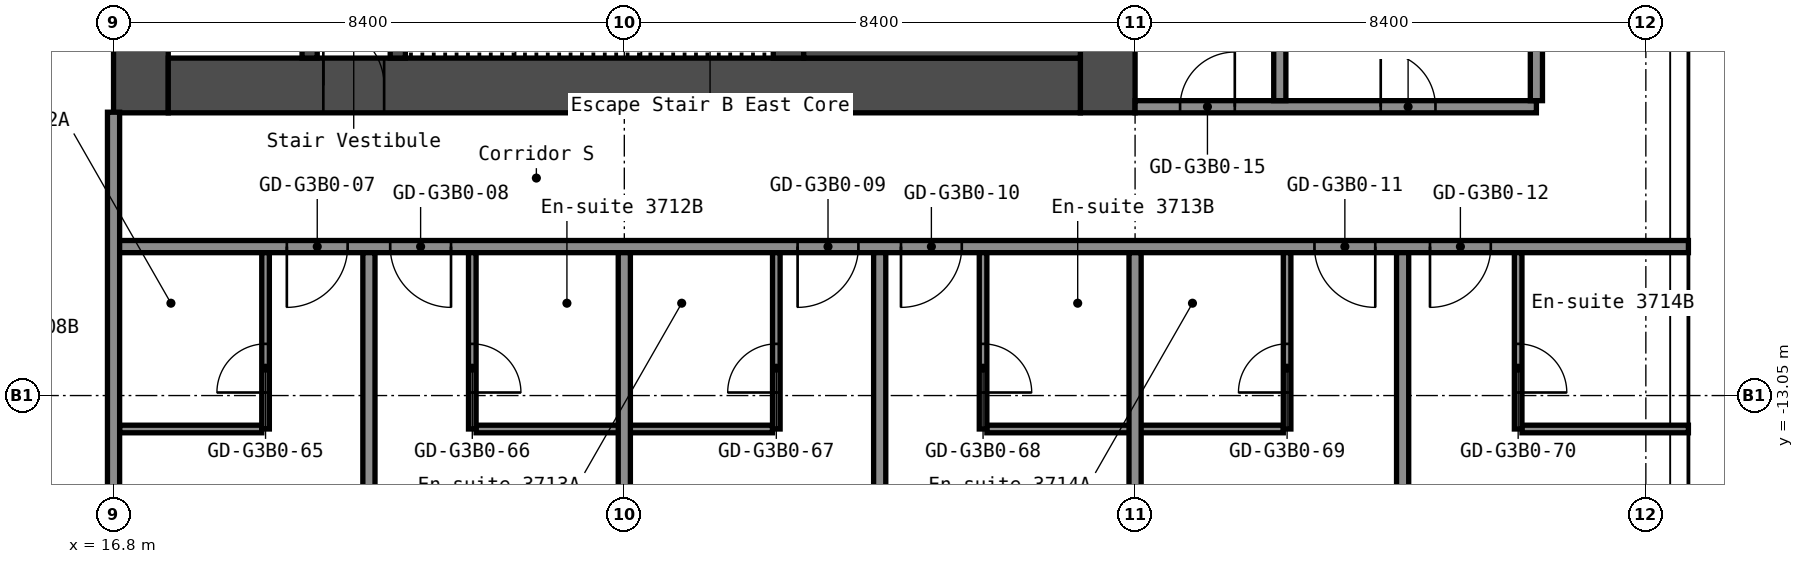
"""IFC4 building model, lengths in metres.
Left out: names, types, materials, properties, quantities, classifications, styles, units other than length and angle.
Written with IfcOpenShell. Run it as: python <this file> out.ifc"""

import sys

from ifc_helpers import new_model, si_unit, direction, frame, frame_2d, origin, place, context, subcontext, project, spatial, rectangle, extrude, element, fill, save


model = new_model("IFC4")
c1 = context("Model", 3, precision=1e-05, world=origin(), true_north=direction((0.0, 1.0)))
c2 = subcontext(c1, "Body", "Model", "MODEL_VIEW")
j1 = project(units=[si_unit("LENGTHUNIT", "METRE"), si_unit("PLANEANGLEUNIT", "RADIAN")], contexts=[c1])
p1 = place(None, origin())
s1 = spatial("IfcSite", under=j1, at=p1, CompositionType="ELEMENT")
p2 = place(p1, origin())
s2 = spatial("IfcBuilding", under=s1, at=p2, CompositionType="ELEMENT")
p3 = place(p2, frame((0.0, 0.0, 134.2)))
s3 = spatial("IfcBuildingStorey", under=s2, at=p3, CompositionType="ELEMENT", Elevation=134.2)
p4 = place(p3, frame((17.25, -8.4, 0.0), z_axis=(0.0, 0.0, 1.0), x_axis=(0.0, 1.0, 0.0)))
e1 = element("IfcWall", 1, at=p4, inside=s3, PredefinedType="SHEAR", context=c2, shape_type="SweptSolid", body=[
    extrude(rectangle(XDim=16.8, YDim=0.9, at=frame_2d((8.4, 0.0))), origin(), (0.0, 0.0, 1.0), 2.75),
])
p5 = place(p4, frame((7.1, 0.0, 0.0)))
e2 = element("IfcOpeningElement", 2, at=p5, cuts=e1, PredefinedType="OPENING", context=c2, shape_type="SweptSolid", body=[
    extrude(rectangle(XDim=1.6, YDim=2.1, at=frame_2d((0.8, 1.05))), frame((0.0, 0.46, 0.0), z_axis=(0.0, -1.0, 0.0), x_axis=(1.0, 0.0, 0.0)), (0.0, 0.0, 1.0), 0.92),
])
p6 = place(p3, frame((33.15, -8.4, 0.0), z_axis=(0.0, 0.0, 1.0), x_axis=(0.0, 1.0, 0.0)))
e3 = element("IfcWall", 3, at=p6, inside=s3, PredefinedType="SHEAR", context=c2, shape_type="SweptSolid", body=[
    extrude(rectangle(XDim=16.8, YDim=0.9, at=frame_2d((8.4, 0.0))), origin(), (0.0, 0.0, 1.0), 2.75),
])
p7 = place(p3, frame((17.7, -7.95, 0.0), z_axis=(0.0, 0.0, 1.0), x_axis=(1.0, 0.0, 0.0)))
e4 = element("IfcWall", 4, at=p7, inside=s3, PredefinedType="SHEAR", context=c2, shape_type="SweptSolid", body=[
    extrude(rectangle(XDim=15.0, YDim=0.9, at=frame_2d((7.5, 0.0))), origin(), (0.0, 0.0, 1.0), 2.75),
])
p8 = place(p7, frame((2.55, 0.0, 0.0)))
e5 = element("IfcOpeningElement", 5, at=p8, cuts=e4, PredefinedType="OPENING", context=c2, shape_type="SweptSolid", body=[
    extrude(rectangle(XDim=1.0, YDim=2.1, at=frame_2d((0.5, 1.05))), frame((0.0, 0.46, 0.0), z_axis=(0.0, -1.0, 0.0), x_axis=(1.0, 0.0, 0.0)), (0.0, 0.0, 1.0), 0.92),
])
p9 = place(p3, frame((20.025, -7.5, 0.0), z_axis=(0.0, 0.0, 1.0), x_axis=(0.0, 1.0, 0.0)))
e6 = element("IfcWall", 6, at=p9, inside=s3, PredefinedType="SHEAR", context=c2, shape_type="SweptSolid", body=[
    extrude(rectangle(XDim=6.3, YDim=0.25, at=frame_2d((3.15, 0.0))), origin(), (0.0, 0.0, 1.0), 2.75),
])
p10 = place(p9, frame((2.4, 0.0, 0.0)))
e7 = element("IfcOpeningElement", 7, at=p10, cuts=e6, PredefinedType="OPENING", context=c2, shape_type="SweptSolid", body=[
    extrude(rectangle(XDim=1.0, YDim=2.1, at=frame_2d((0.5, 1.05))), frame((0.0, 0.135, 0.0), z_axis=(0.0, -1.0, 0.0), x_axis=(1.0, 0.0, 0.0)), (0.0, 0.0, 1.0), 0.27),
])
p11 = place(p3, frame((21.475, -7.5, 0.0), z_axis=(0.0, 0.0, 1.0), x_axis=(0.0, 1.0, 0.0)))
e8 = element("IfcWall", 8, at=p11, inside=s3, PredefinedType="SHEAR", context=c2, shape_type="SweptSolid", body=[
    extrude(rectangle(XDim=3.75, YDim=0.25, at=frame_2d((1.875, 0.0))), origin(), (0.0, 0.0, 1.0), 2.75),
])
p12 = place(p11, frame((1.3, 0.0, 0.0)))
e9 = element("IfcOpeningElement", 9, at=p12, cuts=e8, PredefinedType="OPENING", context=c2, shape_type="SweptSolid", body=[
    extrude(rectangle(XDim=1.2, YDim=2.1, at=frame_2d((0.6, 1.05))), frame((0.0, 0.135, 0.0), z_axis=(0.0, -1.0, 0.0), x_axis=(1.0, 0.0, 0.0)), (0.0, 0.0, 1.0), 0.27),
])
p13 = place(p3, frame((27.9, -7.5, 0.0), z_axis=(0.0, 0.0, 1.0), x_axis=(0.0, 1.0, 0.0)))
e10 = element("IfcWall", 10, at=p13, inside=s3, PredefinedType="SHEAR", context=c2, shape_type="SweptSolid", body=[
    extrude(rectangle(XDim=3.75, YDim=0.5, at=frame_2d((1.875, 0.0))), origin(), (0.0, 0.0, 1.0), 2.75),
])
p14 = place(p3, frame((28.15, -6.75, 0.0), z_axis=(0.0, 0.0, 1.0), x_axis=(1.0, 0.0, 0.0)))
e11 = element("IfcWall", 11, at=p14, inside=s3, PredefinedType="SHEAR", context=c2, shape_type="SweptSolid", body=[
    extrude(rectangle(XDim=4.55, YDim=1.5, at=frame_2d((2.275, 0.0))), origin(), (0.0, 0.0, 1.0), 2.75),
])
p15 = place(p3, frame((16.9, -13.6, 0.0), z_axis=(0.0, 0.0, 1.0), x_axis=(1.0, 0.0, 0.0)))
e12 = element("IfcWall", 12, at=p15, inside=s3, PredefinedType="PARTITIONING", context=c2, shape_type="SweptSolid", body=[
    extrude(rectangle(XDim=2.338, YDim=0.125, at=frame_2d((1.169, 0.0))), origin(), (0.0, 0.0, 1.0), 2.75),
])
for number, where, z_axis, x_axis in (
    (13, (22.762, -13.6, 0.0), (0.0, 0.0, 1.0), (1.0, 0.0, 0.0)),
    (14, (31.163, -13.6, 0.0), (0.0, 0.0, 1.0), (1.0, 0.0, 0.0)),
):
    element("IfcWall", number, at=place(p3, frame(where, z_axis=z_axis, x_axis=x_axis)), inside=s3, PredefinedType="PARTITIONING", context=c2, shape_type="SweptSolid", body=[
        extrude(rectangle(XDim=4.875, YDim=0.125, at=frame_2d((2.438, 0.0))), origin(), (0.0, 0.0, 1.0), 2.75),
    ])
p16 = place(p3, frame((39.962, -13.6, 0.0), z_axis=(0.0, 0.0, 1.0), x_axis=(1.0, 0.0, 0.0)))
e15 = element("IfcWall", 15, at=p16, inside=s3, PredefinedType="PARTITIONING", context=c2, shape_type="SweptSolid", body=[
    extrude(rectangle(XDim=2.738, YDim=0.125, at=frame_2d((1.369, 0.0))), origin(), (0.0, 0.0, 1.0), 2.75),
])
p17 = place(p3, frame((16.8, -10.6, 0.0), z_axis=(0.0, 0.0, 1.0), x_axis=(1.0, 0.0, 0.0)))
e16 = element("IfcWall", 16, at=p17, inside=s3, PredefinedType="PARTITIONING", context=c2, shape_type="SweptSolid", body=[
    extrude(rectangle(XDim=25.9, YDim=0.2, at=frame_2d((12.95, 0.0))), origin(), (0.0, 0.0, 1.0), 2.75),
])
p18 = place(p17, frame((2.85, 0.0, 0.0)))
e17 = element("IfcOpeningElement", 17, at=p18, cuts=e16, PredefinedType="OPENING", context=c2, shape_type="SweptSolid", body=[
    extrude(rectangle(XDim=1.0, YDim=2.1, at=frame_2d((0.5, 1.05))), frame((0.0, 0.11, 0.0), z_axis=(0.0, -1.0, 0.0), x_axis=(1.0, 0.0, 0.0)), (0.0, 0.0, 1.0), 0.22),
])
p19 = place(p17, frame((4.55, 0.0, 0.0)))
e18 = element("IfcOpeningElement", 18, at=p19, cuts=e16, PredefinedType="OPENING", context=c2, shape_type="SweptSolid", body=[
    extrude(rectangle(XDim=1.0, YDim=2.1, at=frame_2d((0.5, 1.05))), frame((0.0, 0.11, 0.0), z_axis=(0.0, -1.0, 0.0), x_axis=(1.0, 0.0, 0.0)), (0.0, 0.0, 1.0), 0.22),
])
p20 = place(p17, frame((11.25, 0.0, 0.0)))
e19 = element("IfcOpeningElement", 19, at=p20, cuts=e16, PredefinedType="OPENING", context=c2, shape_type="SweptSolid", body=[
    extrude(rectangle(XDim=1.0, YDim=2.1, at=frame_2d((0.5, 1.05))), frame((0.0, 0.11, 0.0), z_axis=(0.0, -1.0, 0.0), x_axis=(1.0, 0.0, 0.0)), (0.0, 0.0, 1.0), 0.22),
])
p21 = place(p17, frame((12.95, 0.0, 0.0)))
e20 = element("IfcOpeningElement", 20, at=p21, cuts=e16, PredefinedType="OPENING", context=c2, shape_type="SweptSolid", body=[
    extrude(rectangle(XDim=1.0, YDim=2.1, at=frame_2d((0.5, 1.05))), frame((0.0, 0.11, 0.0), z_axis=(0.0, -1.0, 0.0), x_axis=(1.0, 0.0, 0.0)), (0.0, 0.0, 1.0), 0.22),
])
p22 = place(p17, frame((19.75, 0.0, 0.0)))
e21 = element("IfcOpeningElement", 21, at=p22, cuts=e16, PredefinedType="OPENING", context=c2, shape_type="SweptSolid", body=[
    extrude(rectangle(XDim=1.0, YDim=2.1, at=frame_2d((0.5, 1.05))), frame((0.0, 0.11, 0.0), z_axis=(0.0, -1.0, 0.0), x_axis=(1.0, 0.0, 0.0)), (0.0, 0.0, 1.0), 0.22),
])
p23 = place(p17, frame((21.65, 0.0, 0.0)))
e22 = element("IfcOpeningElement", 22, at=p23, cuts=e16, PredefinedType="OPENING", context=c2, shape_type="SweptSolid", body=[
    extrude(rectangle(XDim=1.0, YDim=2.1, at=frame_2d((0.5, 1.05))), frame((0.0, 0.11, 0.0), z_axis=(0.0, -1.0, 0.0), x_axis=(1.0, 0.0, 0.0)), (0.0, 0.0, 1.0), 0.22),
])
p24 = place(p3, frame((33.6, -8.3, 0.0), z_axis=(0.0, 0.0, 1.0), x_axis=(1.0, 0.0, 0.0)))
e23 = element("IfcWall", 23, at=p24, inside=s3, PredefinedType="PARTITIONING", context=c2, shape_type="SweptSolid", body=[
    extrude(rectangle(XDim=6.6, YDim=0.2, at=frame_2d((3.3, 0.0))), origin(), (0.0, 0.0, 1.0), 2.75),
])
p25 = place(p24, frame((0.74, 0.0, 0.0)))
e24 = element("IfcOpeningElement", 24, at=p25, cuts=e23, PredefinedType="OPENING", context=c2, shape_type="SweptSolid", body=[
    extrude(rectangle(XDim=0.9, YDim=2.1, at=frame_2d((0.45, 1.05))), frame((0.0, 0.11, 0.0), z_axis=(0.0, -1.0, 0.0), x_axis=(1.0, 0.0, 0.0)), (0.0, 0.0, 1.0), 0.22),
])
p26 = place(p24, frame((4.04, 0.0, 0.0)))
e25 = element("IfcOpeningElement", 25, at=p26, cuts=e23, PredefinedType="OPENING", context=c2, shape_type="SweptSolid", body=[
    extrude(rectangle(XDim=0.9, YDim=2.1, at=frame_2d((0.45, 1.05))), frame((0.0, 0.11, 0.0), z_axis=(0.0, -1.0, 0.0), x_axis=(1.0, 0.0, 0.0)), (0.0, 0.0, 1.0), 0.22),
])
p27 = place(p3, frame((16.8, -19.3, 0.0), z_axis=(0.0, 0.0, 1.0), x_axis=(0.0, 1.0, 0.0)))
e26 = element("IfcWall", 26, at=p27, inside=s3, PredefinedType="PARTITIONING", context=c2, shape_type="SweptSolid", body=[
    extrude(rectangle(XDim=10.91, YDim=0.2, at=frame_2d((5.455, 0.0))), origin(), (0.0, 0.0, 1.0), 2.75),
])
p28 = place(p3, frame((19.3, -13.6, 0.0), z_axis=(0.0, 0.0, 1.0), x_axis=(0.0, 1.0, 0.0)))
e27 = element("IfcWall", 27, at=p28, inside=s3, PredefinedType="PARTITIONING", context=c2, shape_type="SweptSolid", body=[
    extrude(rectangle(XDim=2.9, YDim=0.125, at=frame_2d((1.45, 0.0))), origin(), (0.0, 0.0, 1.0), 2.75),
])
p29 = place(p28, frame((0.6, 0.0, 0.0)))
e28 = element("IfcOpeningElement", 28, at=p29, cuts=e27, PredefinedType="OPENING", context=c2, shape_type="SweptSolid", body=[
    extrude(rectangle(XDim=0.8, YDim=2.1, at=frame_2d((0.4, 1.05))), frame((0.0, 0.073, 0.0), z_axis=(0.0, -1.0, 0.0), x_axis=(1.0, 0.0, 0.0)), (0.0, 0.0, 1.0), 0.145),
])
p30 = place(p3, frame((21.0, -19.3, 0.0), z_axis=(0.0, 0.0, 1.0), x_axis=(0.0, 1.0, 0.0)))
e29 = element("IfcWall", 29, at=p30, inside=s3, PredefinedType="PARTITIONING", context=c2, shape_type="SweptSolid", body=[
    extrude(rectangle(XDim=8.6, YDim=0.2, at=frame_2d((4.3, 0.0))), origin(), (0.0, 0.0, 1.0), 2.75),
])
p31 = place(p3, frame((22.7, -13.6, 0.0), z_axis=(0.0, 0.0, 1.0), x_axis=(0.0, 1.0, 0.0)))
e30 = element("IfcWall", 30, at=p31, inside=s3, PredefinedType="PARTITIONING", context=c2, shape_type="SweptSolid", body=[
    extrude(rectangle(XDim=2.9, YDim=0.125, at=frame_2d((1.45, 0.0))), origin(), (0.0, 0.0, 1.0), 2.75),
])
p32 = place(p31, frame((0.6, 0.0, 0.0)))
e31 = element("IfcOpeningElement", 31, at=p32, cuts=e30, PredefinedType="OPENING", context=c2, shape_type="SweptSolid", body=[
    extrude(rectangle(XDim=0.8, YDim=2.1, at=frame_2d((0.4, 1.05))), frame((0.0, 0.073, 0.0), z_axis=(0.0, -1.0, 0.0), x_axis=(1.0, 0.0, 0.0)), (0.0, 0.0, 1.0), 0.145),
])
p33 = place(p3, frame((25.2, -19.3, 0.0), z_axis=(0.0, 0.0, 1.0), x_axis=(0.0, 1.0, 0.0)))
e32 = element("IfcWall", 32, at=p33, inside=s3, PredefinedType="PARTITIONING", context=c2, shape_type="SweptSolid", body=[
    extrude(rectangle(XDim=8.6, YDim=0.2, at=frame_2d((4.3, 0.0))), origin(), (0.0, 0.0, 1.0), 2.75),
])
p34 = place(p3, frame((27.7, -13.6, 0.0), z_axis=(0.0, 0.0, 1.0), x_axis=(0.0, 1.0, 0.0)))
e33 = element("IfcWall", 33, at=p34, inside=s3, PredefinedType="PARTITIONING", context=c2, shape_type="SweptSolid", body=[
    extrude(rectangle(XDim=2.9, YDim=0.125, at=frame_2d((1.45, 0.0))), origin(), (0.0, 0.0, 1.0), 2.75),
])
p35 = place(p34, frame((0.6, 0.0, 0.0)))
e34 = element("IfcOpeningElement", 34, at=p35, cuts=e33, PredefinedType="OPENING", context=c2, shape_type="SweptSolid", body=[
    extrude(rectangle(XDim=0.8, YDim=2.1, at=frame_2d((0.4, 1.05))), frame((0.0, 0.073, 0.0), z_axis=(0.0, -1.0, 0.0), x_axis=(1.0, 0.0, 0.0)), (0.0, 0.0, 1.0), 0.145),
])
p36 = place(p3, frame((29.4, -19.3, 0.0), z_axis=(0.0, 0.0, 1.0), x_axis=(0.0, 1.0, 0.0)))
e35 = element("IfcWall", 35, at=p36, inside=s3, PredefinedType="PARTITIONING", context=c2, shape_type="SweptSolid", body=[
    extrude(rectangle(XDim=8.6, YDim=0.2, at=frame_2d((4.3, 0.0))), origin(), (0.0, 0.0, 1.0), 2.75),
])
p37 = place(p3, frame((31.1, -13.6, 0.0), z_axis=(0.0, 0.0, 1.0), x_axis=(0.0, 1.0, 0.0)))
e36 = element("IfcWall", 36, at=p37, inside=s3, PredefinedType="PARTITIONING", context=c2, shape_type="SweptSolid", body=[
    extrude(rectangle(XDim=2.9, YDim=0.125, at=frame_2d((1.45, 0.0))), origin(), (0.0, 0.0, 1.0), 2.75),
])
p38 = place(p37, frame((0.6, 0.0, 0.0)))
e37 = element("IfcOpeningElement", 37, at=p38, cuts=e36, PredefinedType="OPENING", context=c2, shape_type="SweptSolid", body=[
    extrude(rectangle(XDim=0.8, YDim=2.1, at=frame_2d((0.4, 1.05))), frame((0.0, 0.073, 0.0), z_axis=(0.0, -1.0, 0.0), x_axis=(1.0, 0.0, 0.0)), (0.0, 0.0, 1.0), 0.145),
])
p39 = place(p3, frame((33.6, -19.3, 0.0), z_axis=(0.0, 0.0, 1.0), x_axis=(0.0, 1.0, 0.0)))
e38 = element("IfcWall", 38, at=p39, inside=s3, PredefinedType="PARTITIONING", context=c2, shape_type="SweptSolid", body=[
    extrude(rectangle(XDim=8.6, YDim=0.2, at=frame_2d((4.3, 0.0))), origin(), (0.0, 0.0, 1.0), 2.75),
])
p40 = place(p3, frame((35.98, -8.2, 0.0), z_axis=(0.0, 0.0, 1.0), x_axis=(0.0, 1.0, 0.0)))
e39 = element("IfcWall", 39, at=p40, inside=s3, PredefinedType="PARTITIONING", context=c2, shape_type="SweptSolid", body=[
    extrude(rectangle(XDim=8.2, YDim=0.2, at=frame_2d((4.1, 0.0))), origin(), (0.0, 0.0, 1.0), 2.75),
])
p41 = place(p3, frame((36.1, -13.6, 0.0), z_axis=(0.0, 0.0, 1.0), x_axis=(0.0, 1.0, 0.0)))
e40 = element("IfcWall", 40, at=p41, inside=s3, PredefinedType="PARTITIONING", context=c2, shape_type="SweptSolid", body=[
    extrude(rectangle(XDim=2.9, YDim=0.125, at=frame_2d((1.45, 0.0))), origin(), (0.0, 0.0, 1.0), 2.75),
])
p42 = place(p41, frame((0.6, 0.0, 0.0)))
e41 = element("IfcOpeningElement", 41, at=p42, cuts=e40, PredefinedType="OPENING", context=c2, shape_type="SweptSolid", body=[
    extrude(rectangle(XDim=0.8, YDim=2.1, at=frame_2d((0.4, 1.05))), frame((0.0, 0.073, 0.0), z_axis=(0.0, -1.0, 0.0), x_axis=(1.0, 0.0, 0.0)), (0.0, 0.0, 1.0), 0.145),
])
p43 = place(p3, frame((38.0, -19.3, 0.0), z_axis=(0.0, 0.0, 1.0), x_axis=(0.0, 1.0, 0.0)))
e42 = element("IfcWall", 42, at=p43, inside=s3, PredefinedType="PARTITIONING", context=c2, shape_type="SweptSolid", body=[
    extrude(rectangle(XDim=8.6, YDim=0.2, at=frame_2d((4.3, 0.0))), origin(), (0.0, 0.0, 1.0), 2.75),
])
p44 = place(p3, frame((39.9, -13.6, 0.0), z_axis=(0.0, 0.0, 1.0), x_axis=(0.0, 1.0, 0.0)))
e43 = element("IfcWall", 43, at=p44, inside=s3, PredefinedType="PARTITIONING", context=c2, shape_type="SweptSolid", body=[
    extrude(rectangle(XDim=2.9, YDim=0.125, at=frame_2d((1.45, 0.0))), origin(), (0.0, 0.0, 1.0), 2.75),
])
p45 = place(p44, frame((0.6, 0.0, 0.0)))
e44 = element("IfcOpeningElement", 44, at=p45, cuts=e43, PredefinedType="OPENING", context=c2, shape_type="SweptSolid", body=[
    extrude(rectangle(XDim=0.8, YDim=2.1, at=frame_2d((0.4, 1.05))), frame((0.0, 0.073, 0.0), z_axis=(0.0, -1.0, 0.0), x_axis=(1.0, 0.0, 0.0)), (0.0, 0.0, 1.0), 0.145),
])
p46 = place(p3, frame((40.2, -8.2, 0.0), z_axis=(0.0, 0.0, 1.0), x_axis=(0.0, 1.0, 0.0)))
e45 = element("IfcWall", 45, at=p46, inside=s3, PredefinedType="PARTITIONING", context=c2, shape_type="SweptSolid", body=[
    extrude(rectangle(XDim=16.4, YDim=0.2, at=frame_2d((8.2, 0.0))), origin(), (0.0, 0.0, 1.0), 2.75),
])
p47 = place(p8, origin())
e46 = element("IfcDoor", 46, at=p47, inside=s3, OperationType="SINGLE_SWING_RIGHT", PredefinedType="DOOR", context=c2, shape_type="SweptSolid", body=[
    extrude(rectangle(XDim=1.0, YDim=2.1, at=frame_2d((0.5, 1.05))), frame((0.0, 0.025, 0.0), z_axis=(0.0, -1.0, 0.0), x_axis=(1.0, 0.0, 0.0)), (0.0, 0.0, 1.0), 0.05),
])
fill(e5, e46)
p48 = place(p18, origin())
e47 = element("IfcDoor", 47, at=p48, inside=s3, OperationType="SINGLE_SWING_LEFT", PredefinedType="DOOR", context=c2, shape_type="SweptSolid", body=[
    extrude(rectangle(XDim=1.0, YDim=2.1, at=frame_2d((0.5, 1.05))), frame((0.0, 0.025, 0.0), z_axis=(0.0, -1.0, 0.0), x_axis=(1.0, 0.0, 0.0)), (0.0, 0.0, 1.0), 0.05),
])
fill(e17, e47)
p49 = place(p19, origin())
e48 = element("IfcDoor", 48, at=p49, inside=s3, OperationType="SINGLE_SWING_RIGHT", PredefinedType="DOOR", context=c2, shape_type="SweptSolid", body=[
    extrude(rectangle(XDim=1.0, YDim=2.1, at=frame_2d((0.5, 1.05))), frame((0.0, 0.025, 0.0), z_axis=(0.0, -1.0, 0.0), x_axis=(1.0, 0.0, 0.0)), (0.0, 0.0, 1.0), 0.05),
])
fill(e18, e48)
p50 = place(p20, origin())
e49 = element("IfcDoor", 49, at=p50, inside=s3, OperationType="SINGLE_SWING_LEFT", PredefinedType="DOOR", context=c2, shape_type="SweptSolid", body=[
    extrude(rectangle(XDim=1.0, YDim=2.1, at=frame_2d((0.5, 1.05))), frame((0.0, 0.025, 0.0), z_axis=(0.0, -1.0, 0.0), x_axis=(1.0, 0.0, 0.0)), (0.0, 0.0, 1.0), 0.05),
])
fill(e19, e49)
p51 = place(p21, origin())
e50 = element("IfcDoor", 50, at=p51, inside=s3, OperationType="SINGLE_SWING_LEFT", PredefinedType="DOOR", context=c2, shape_type="SweptSolid", body=[
    extrude(rectangle(XDim=1.0, YDim=2.1, at=frame_2d((0.5, 1.05))), frame((0.0, 0.025, 0.0), z_axis=(0.0, -1.0, 0.0), x_axis=(1.0, 0.0, 0.0)), (0.0, 0.0, 1.0), 0.05),
])
fill(e20, e50)
p52 = place(p22, origin())
e51 = element("IfcDoor", 51, at=p52, inside=s3, OperationType="SINGLE_SWING_RIGHT", PredefinedType="DOOR", context=c2, shape_type="SweptSolid", body=[
    extrude(rectangle(XDim=1.0, YDim=2.1, at=frame_2d((0.5, 1.05))), frame((0.0, 0.025, 0.0), z_axis=(0.0, -1.0, 0.0), x_axis=(1.0, 0.0, 0.0)), (0.0, 0.0, 1.0), 0.05),
])
fill(e21, e51)
p53 = place(p23, origin())
e52 = element("IfcDoor", 52, at=p53, inside=s3, OperationType="SINGLE_SWING_LEFT", PredefinedType="DOOR", context=c2, shape_type="SweptSolid", body=[
    extrude(rectangle(XDim=1.0, YDim=2.1, at=frame_2d((0.5, 1.05))), frame((0.0, 0.025, 0.0), z_axis=(0.0, -1.0, 0.0), x_axis=(1.0, 0.0, 0.0)), (0.0, 0.0, 1.0), 0.05),
])
fill(e22, e52)
p54 = place(p25, origin())
e53 = element("IfcDoor", 53, at=p54, inside=s3, OperationType="SINGLE_SWING_LEFT", PredefinedType="DOOR", context=c2, shape_type="SweptSolid", body=[
    extrude(rectangle(XDim=0.9, YDim=2.1, at=frame_2d((0.45, 1.05))), frame((0.0, 0.025, 0.0), z_axis=(0.0, -1.0, 0.0), x_axis=(1.0, 0.0, 0.0)), (0.0, 0.0, 1.0), 0.05),
])
fill(e24, e53)
p55 = place(p26, origin())
e54 = element("IfcDoor", 54, at=p55, inside=s3, OperationType="SINGLE_SWING_RIGHT", PredefinedType="DOOR", context=c2, shape_type="SweptSolid", body=[
    extrude(rectangle(XDim=0.9, YDim=2.1, at=frame_2d((0.45, 1.05))), frame((0.0, 0.025, 0.0), z_axis=(0.0, -1.0, 0.0), x_axis=(1.0, 0.0, 0.0)), (0.0, 0.0, 1.0), 0.05),
])
fill(e25, e54)
p56 = place(p29, origin())
e55 = element("IfcDoor", 55, at=p56, inside=s3, OperationType="SINGLE_SWING_RIGHT", PredefinedType="DOOR", context=c2, shape_type="SweptSolid", body=[
    extrude(rectangle(XDim=0.8, YDim=2.1, at=frame_2d((0.4, 1.05))), frame((0.0, 0.025, 0.0), z_axis=(0.0, -1.0, 0.0), x_axis=(1.0, 0.0, 0.0)), (0.0, 0.0, 1.0), 0.05),
])
fill(e28, e55)
p57 = place(p32, origin())
e56 = element("IfcDoor", 56, at=p57, inside=s3, OperationType="SINGLE_SWING_LEFT", PredefinedType="DOOR", context=c2, shape_type="SweptSolid", body=[
    extrude(rectangle(XDim=0.8, YDim=2.1, at=frame_2d((0.4, 1.05))), frame((0.0, 0.025, 0.0), z_axis=(0.0, -1.0, 0.0), x_axis=(1.0, 0.0, 0.0)), (0.0, 0.0, 1.0), 0.05),
])
fill(e31, e56)
p58 = place(p35, origin())
e57 = element("IfcDoor", 57, at=p58, inside=s3, OperationType="SINGLE_SWING_RIGHT", PredefinedType="DOOR", context=c2, shape_type="SweptSolid", body=[
    extrude(rectangle(XDim=0.8, YDim=2.1, at=frame_2d((0.4, 1.05))), frame((0.0, 0.025, 0.0), z_axis=(0.0, -1.0, 0.0), x_axis=(1.0, 0.0, 0.0)), (0.0, 0.0, 1.0), 0.05),
])
fill(e34, e57)
p59 = place(p38, origin())
e58 = element("IfcDoor", 58, at=p59, inside=s3, OperationType="SINGLE_SWING_LEFT", PredefinedType="DOOR", context=c2, shape_type="SweptSolid", body=[
    extrude(rectangle(XDim=0.8, YDim=2.1, at=frame_2d((0.4, 1.05))), frame((0.0, 0.025, 0.0), z_axis=(0.0, -1.0, 0.0), x_axis=(1.0, 0.0, 0.0)), (0.0, 0.0, 1.0), 0.05),
])
fill(e37, e58)
p60 = place(p42, origin())
e59 = element("IfcDoor", 59, at=p60, inside=s3, OperationType="SINGLE_SWING_RIGHT", PredefinedType="DOOR", context=c2, shape_type="SweptSolid", body=[
    extrude(rectangle(XDim=0.8, YDim=2.1, at=frame_2d((0.4, 1.05))), frame((0.0, 0.025, 0.0), z_axis=(0.0, -1.0, 0.0), x_axis=(1.0, 0.0, 0.0)), (0.0, 0.0, 1.0), 0.05),
])
fill(e41, e59)
p61 = place(p45, origin())
e60 = element("IfcDoor", 60, at=p61, inside=s3, OperationType="SINGLE_SWING_LEFT", PredefinedType="DOOR", context=c2, shape_type="SweptSolid", body=[
    extrude(rectangle(XDim=0.8, YDim=2.1, at=frame_2d((0.4, 1.05))), frame((0.0, 0.025, 0.0), z_axis=(0.0, -1.0, 0.0), x_axis=(1.0, 0.0, 0.0)), (0.0, 0.0, 1.0), 0.05),
])
fill(e44, e60)
save(model, sys.argv[1])
